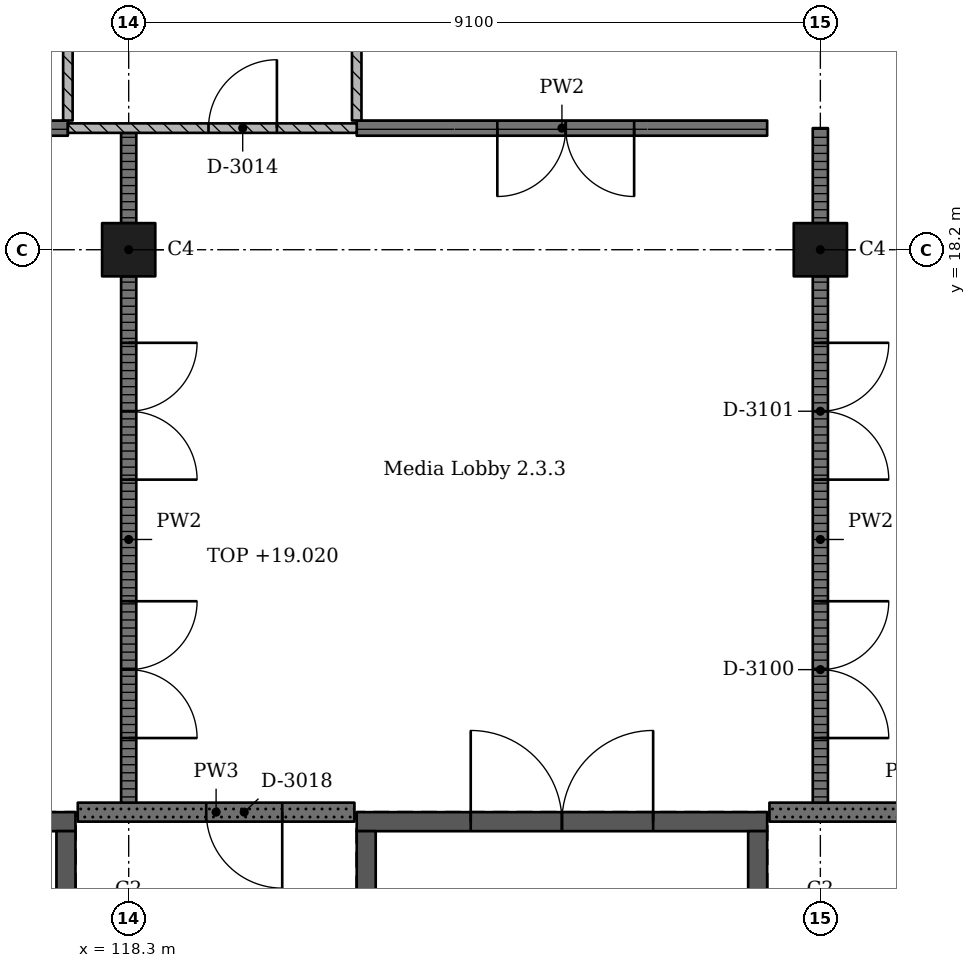
"""IFC4 building model, lengths in metres.
Left out: names, types, materials, properties, quantities, classifications, styles, units other than length and angle.
Written with IfcOpenShell. Run it as: python <this file> out.ifc"""

import sys

from ifc_helpers import new_model, si_unit, direction, frame, frame_2d, origin, origin_2d, place, context, subcontext, project, spatial, rectangle, extrude, element, fill, save


model = new_model("IFC4")
c1 = context("Model", 3, precision=1e-05, world=origin(), true_north=direction((0.0, 1.0)))
c2 = subcontext(c1, "Body", "Model", "MODEL_VIEW")
j1 = project(units=[si_unit("LENGTHUNIT", "METRE"), si_unit("PLANEANGLEUNIT", "RADIAN")], contexts=[c1])
p1 = place(None, origin())
s1 = spatial("IfcSite", under=j1, at=p1, CompositionType="ELEMENT")
p2 = place(p1, origin())
s2 = spatial("IfcBuilding", under=s1, at=p2, CompositionType="ELEMENT")
p3 = place(p2, frame((0.0, 0.0, 15.47)))
s3 = spatial("IfcBuildingStorey", under=s2, at=p3, CompositionType="ELEMENT", Elevation=15.47)
for number, where, z_axis, x_axis in (
    (1, (118.3, 18.2, 0.0), (0.0, 0.0, 1.0), (1.0, 0.0, 0.0)),
    (2, (127.4, 18.2, 0.0), (0.0, 0.0, 1.0), (1.0, 0.0, 0.0)),
):
    element("IfcColumn", number, at=place(p3, frame(where, z_axis=z_axis, x_axis=x_axis)), inside=s3, PredefinedType="COLUMN", context=c2, shape_type="SweptSolid", body=[
        extrude(rectangle(XDim=0.7, YDim=0.7, at=origin_2d()), origin(), (0.0, 0.0, 1.0), 4.55),
    ])
p4 = place(p3, frame((126.7, 10.675, 0.0), z_axis=(0.0, 0.0, 1.0), x_axis=(-1.0, 0.0, 0.0)))
e3 = element("IfcWall", 3, at=p4, inside=s3, PredefinedType="SHEAR", context=c2, shape_type="SweptSolid", body=[
    extrude(rectangle(XDim=5.4, YDim=0.25, at=frame_2d((2.7, 0.0))), origin(), (0.0, 0.0, 1.0), 4.55),
])
p5 = place(p4, frame((1.5, 0.0, 0.0)))
e4 = element("IfcOpeningElement", 4, at=p5, cuts=e3, PredefinedType="OPENING", context=c2, shape_type="SweptSolid", body=[
    extrude(rectangle(XDim=2.4, YDim=2.1, at=frame_2d((1.2, 1.05))), frame((0.0, 0.135, 0.0), z_axis=(0.0, -1.0, 0.0), x_axis=(1.0, 0.0, 0.0)), (0.0, 0.0, 1.0), 0.27),
])
for number, where, z_axis, x_axis in (
    (5, (121.425, 10.55, 0.0), (0.0, 0.0, 1.0), (0.0, -1.0, 0.0)),
    (6, (126.575, 10.55, 0.0), (0.0, 0.0, 1.0), (0.0, -1.0, 0.0)),
):
    element("IfcWall", number, at=place(p3, frame(where, z_axis=z_axis, x_axis=x_axis)), inside=s3, PredefinedType="SHEAR", context=c2, shape_type="SweptSolid", body=[
        extrude(rectangle(XDim=9.6, YDim=0.25, at=frame_2d((4.8, 0.0))), origin(), (0.0, 0.0, 1.0), 4.55),
    ])
p6 = place(p3, frame((117.6, 10.675, 0.0), z_axis=(0.0, 0.0, 1.0), x_axis=(-1.0, 0.0, 0.0)))
e7 = element("IfcWall", 7, at=p6, inside=s3, PredefinedType="SHEAR", context=c2, shape_type="SweptSolid", body=[
    extrude(rectangle(XDim=5.4, YDim=0.25, at=frame_2d((2.7, 0.0))), origin(), (0.0, 0.0, 1.0), 4.55),
])
p7 = place(p6, frame((1.5, 0.0, 0.0)))
e8 = element("IfcOpeningElement", 8, at=p7, cuts=e7, PredefinedType="OPENING", context=c2, shape_type="SweptSolid", body=[
    extrude(rectangle(XDim=2.4, YDim=2.1, at=frame_2d((1.2, 1.05))), frame((0.0, 0.135, 0.0), z_axis=(0.0, -1.0, 0.0), x_axis=(1.0, 0.0, 0.0)), (0.0, 0.0, 1.0), 0.27),
])
p8 = place(p3, frame((117.475, 10.55, 0.0), z_axis=(0.0, 0.0, 1.0), x_axis=(0.0, -1.0, 0.0)))
e9 = element("IfcWall", 9, at=p8, inside=s3, PredefinedType="SHEAR", context=c2, shape_type="SweptSolid", body=[
    extrude(rectangle(XDim=9.6, YDim=0.25, at=frame_2d((4.8, 0.0))), origin(), (0.0, 0.0, 1.0), 4.55),
])
p9 = place(p3, frame((112.2, 19.8, 0.0), z_axis=(0.0, 0.0, 1.0), x_axis=(1.0, 0.0, 0.0)))
e10 = element("IfcWall", 10, at=p9, inside=s3, PredefinedType="PARTITIONING", context=c2, shape_type="SweptSolid", body=[
    extrude(rectangle(XDim=5.3, YDim=0.2, at=frame_2d((2.65, 0.0))), origin(), (0.0, 0.0, 1.0), 4.3),
])
p10 = place(p9, frame((1.75, 0.0, 0.0)))
e11 = element("IfcOpeningElement", 11, at=p10, cuts=e10, PredefinedType="OPENING", context=c2, shape_type="SweptSolid", body=[
    extrude(rectangle(XDim=1.8, YDim=2.4, at=frame_2d((0.9, 1.2))), frame((0.0, 0.11, 0.0), z_axis=(0.0, -1.0, 0.0), x_axis=(1.0, 0.0, 0.0)), (0.0, 0.0, 1.0), 0.22),
])
p11 = place(p3, frame((117.5, 19.8, 0.0), z_axis=(0.0, 0.0, 1.0), x_axis=(1.0, 0.0, 0.0)))
e12 = element("IfcWall", 12, at=p11, inside=s3, PredefinedType="PARTITIONING", context=c2, shape_type="SweptSolid", body=[
    extrude(rectangle(XDim=3.8, YDim=0.125, at=frame_2d((1.9, 0.0))), origin(), (0.0, 0.0, 1.0), 4.3),
])
p12 = place(p11, frame((1.85, 0.0, 0.0)))
e13 = element("IfcOpeningElement", 13, at=p12, cuts=e12, PredefinedType="OPENING", context=c2, shape_type="SweptSolid", body=[
    extrude(rectangle(XDim=0.9, YDim=2.1, at=frame_2d((0.45, 1.05))), frame((0.0, 0.073, 0.0), z_axis=(0.0, -1.0, 0.0), x_axis=(1.0, 0.0, 0.0)), (0.0, 0.0, 1.0), 0.145),
])
p13 = place(p3, frame((117.5, 19.9, 0.0), z_axis=(0.0, 0.0, 1.0), x_axis=(0.0, 1.0, 0.0)))
e14 = element("IfcWall", 14, at=p13, inside=s3, PredefinedType="PARTITIONING", context=c2, shape_type="SweptSolid", body=[
    extrude(rectangle(XDim=2.87, YDim=0.125, at=frame_2d((1.435, 0.0))), origin(), (0.0, 0.0, 1.0), 4.3),
])
p14 = place(p3, frame((117.63, 10.8, 0.0), z_axis=(0.0, 0.0, 1.0), x_axis=(1.0, 0.0, 0.0)))
e15 = element("IfcWall", 15, at=p14, inside=s3, PredefinedType="SOLIDWALL", context=c2, shape_type="SweptSolid", body=[
    extrude(rectangle(XDim=3.64, YDim=0.25, at=frame_2d((1.82, 0.0))), origin(), (0.0, 0.0, 1.0), 4.3),
])
p15 = place(p14, frame((1.69, 0.0, 0.0)))
e16 = element("IfcOpeningElement", 16, at=p15, cuts=e15, PredefinedType="OPENING", context=c2, shape_type="SweptSolid", body=[
    extrude(rectangle(XDim=1.0, YDim=2.1, at=frame_2d((0.5, 1.05))), frame((0.0, 0.135, 0.0), z_axis=(0.0, -1.0, 0.0), x_axis=(1.0, 0.0, 0.0)), (0.0, 0.0, 1.0), 0.27),
])
p16 = place(p3, frame((118.3, 10.925, 0.0), z_axis=(0.0, 0.0, 1.0), x_axis=(0.0, 1.0, 0.0)))
e17 = element("IfcWall", 17, at=p16, inside=s3, PredefinedType="PARTITIONING", context=c2, shape_type="SweptSolid", body=[
    extrude(rectangle(XDim=6.925, YDim=0.2, at=frame_2d((3.462, 0.0))), origin(), (0.0, 0.0, 1.0), 3.55),
])
p17 = place(p16, frame((0.85, 0.0, 0.0)))
e18 = element("IfcOpeningElement", 18, at=p17, cuts=e17, PredefinedType="OPENING", context=c2, shape_type="SweptSolid", body=[
    extrude(rectangle(XDim=1.8, YDim=2.4, at=frame_2d((0.9, 1.2))), frame((0.0, 0.11, 0.0), z_axis=(0.0, -1.0, 0.0), x_axis=(1.0, 0.0, 0.0)), (0.0, 0.0, 1.0), 0.22),
])
p18 = place(p16, frame((4.25, 0.0, 0.0)))
e19 = element("IfcOpeningElement", 19, at=p18, cuts=e17, PredefinedType="OPENING", context=c2, shape_type="SweptSolid", body=[
    extrude(rectangle(XDim=1.8, YDim=2.4, at=frame_2d((0.9, 1.2))), frame((0.0, 0.11, 0.0), z_axis=(0.0, -1.0, 0.0), x_axis=(1.0, 0.0, 0.0)), (0.0, 0.0, 1.0), 0.22),
])
p19 = place(p3, frame((118.3, 18.55, 0.0), z_axis=(0.0, 0.0, 1.0), x_axis=(0.0, 1.0, 0.0)))
e20 = element("IfcWall", 20, at=p19, inside=s3, PredefinedType="PARTITIONING", context=c2, shape_type="SweptSolid", body=[
    extrude(rectangle(XDim=1.188, YDim=0.2, at=frame_2d((0.594, 0.0))), origin(), (0.0, 0.0, 1.0), 3.55),
])
p20 = place(p3, frame((121.3, 19.8, 0.0), z_axis=(0.0, 0.0, 1.0), x_axis=(1.0, 0.0, 0.0)))
e21 = element("IfcWall", 21, at=p20, inside=s3, PredefinedType="PARTITIONING", context=c2, shape_type="SweptSolid", body=[
    extrude(rectangle(XDim=5.4, YDim=0.2, at=frame_2d((2.7, 0.0))), origin(), (0.0, 0.0, 1.0), 4.3),
])
p21 = place(p20, frame((1.85, 0.0, 0.0)))
e22 = element("IfcOpeningElement", 22, at=p21, cuts=e21, PredefinedType="OPENING", context=c2, shape_type="SweptSolid", body=[
    extrude(rectangle(XDim=1.8, YDim=2.4, at=frame_2d((0.9, 1.2))), frame((0.0, 0.11, 0.0), z_axis=(0.0, -1.0, 0.0), x_axis=(1.0, 0.0, 0.0)), (0.0, 0.0, 1.0), 0.22),
])
p22 = place(p3, frame((121.3, 19.9, 0.0), z_axis=(0.0, 0.0, 1.0), x_axis=(0.0, 1.0, 0.0)))
e23 = element("IfcWall", 23, at=p22, inside=s3, PredefinedType="PARTITIONING", context=c2, shape_type="SweptSolid", body=[
    extrude(rectangle(XDim=6.97, YDim=0.125, at=frame_2d((3.485, 0.0))), origin(), (0.0, 0.0, 1.0), 4.3),
])
p23 = place(p3, frame((126.73, 10.8, 0.0), z_axis=(0.0, 0.0, 1.0), x_axis=(1.0, 0.0, 0.0)))
e24 = element("IfcWall", 24, at=p23, inside=s3, PredefinedType="SOLIDWALL", context=c2, shape_type="SweptSolid", body=[
    extrude(rectangle(XDim=3.64, YDim=0.25, at=frame_2d((1.82, 0.0))), origin(), (0.0, 0.0, 1.0), 4.3),
])
p24 = place(p23, frame((1.79, 0.0, 0.0)))
e25 = element("IfcOpeningElement", 25, at=p24, cuts=e24, PredefinedType="OPENING", context=c2, shape_type="SweptSolid", body=[
    extrude(rectangle(XDim=0.8, YDim=2.1, at=frame_2d((0.4, 1.05))), frame((0.0, 0.135, 0.0), z_axis=(0.0, -1.0, 0.0), x_axis=(1.0, 0.0, 0.0)), (0.0, 0.0, 1.0), 0.27),
])
p25 = place(p3, frame((127.4, 10.925, 0.0), z_axis=(0.0, 0.0, 1.0), x_axis=(0.0, 1.0, 0.0)))
e26 = element("IfcWall", 26, at=p25, inside=s3, PredefinedType="PARTITIONING", context=c2, shape_type="SweptSolid", body=[
    extrude(rectangle(XDim=6.925, YDim=0.2, at=frame_2d((3.462, 0.0))), origin(), (0.0, 0.0, 1.0), 3.55),
])
p26 = place(p25, frame((0.85, 0.0, 0.0)))
e27 = element("IfcOpeningElement", 27, at=p26, cuts=e26, PredefinedType="OPENING", context=c2, shape_type="SweptSolid", body=[
    extrude(rectangle(XDim=1.8, YDim=2.4, at=frame_2d((0.9, 1.2))), frame((0.0, 0.11, 0.0), z_axis=(0.0, -1.0, 0.0), x_axis=(1.0, 0.0, 0.0)), (0.0, 0.0, 1.0), 0.22),
])
p27 = place(p25, frame((4.25, 0.0, 0.0)))
e28 = element("IfcOpeningElement", 28, at=p27, cuts=e26, PredefinedType="OPENING", context=c2, shape_type="SweptSolid", body=[
    extrude(rectangle(XDim=1.8, YDim=2.4, at=frame_2d((0.9, 1.2))), frame((0.0, 0.11, 0.0), z_axis=(0.0, -1.0, 0.0), x_axis=(1.0, 0.0, 0.0)), (0.0, 0.0, 1.0), 0.22),
])
p28 = place(p3, frame((127.4, 18.55, 0.0), z_axis=(0.0, 0.0, 1.0), x_axis=(0.0, 1.0, 0.0)))
e29 = element("IfcWall", 29, at=p28, inside=s3, PredefinedType="PARTITIONING", context=c2, shape_type="SweptSolid", body=[
    extrude(rectangle(XDim=1.25, YDim=0.2, at=frame_2d((0.625, 0.0))), origin(), (0.0, 0.0, 1.0), 3.55),
])
p29 = place(p12, origin())
e30 = element("IfcDoor", 30, at=p29, inside=s3, OperationType="SINGLE_SWING_LEFT", PredefinedType="DOOR", context=c2, shape_type="SweptSolid", body=[
    extrude(rectangle(XDim=0.9, YDim=2.1, at=frame_2d((0.45, 1.05))), frame((0.0, 0.025, 0.0), z_axis=(0.0, -1.0, 0.0), x_axis=(1.0, 0.0, 0.0)), (0.0, 0.0, 1.0), 0.05),
])
fill(e13, e30)
p30 = place(p15, origin())
e31 = element("IfcDoor", 31, at=p30, inside=s3, OperationType="SINGLE_SWING_RIGHT", PredefinedType="DOOR", context=c2, shape_type="SweptSolid", body=[
    extrude(rectangle(XDim=1.0, YDim=2.1, at=frame_2d((0.5, 1.05))), frame((0.0, 0.025, 0.0), z_axis=(0.0, -1.0, 0.0), x_axis=(1.0, 0.0, 0.0)), (0.0, 0.0, 1.0), 0.05),
])
fill(e16, e31)
p31 = place(p26, origin())
e32 = element("IfcDoor", 32, at=p31, inside=s3, OperationType="DOUBLE_DOOR_SINGLE_SWING", PredefinedType="DOOR", context=c2, shape_type="SweptSolid", body=[
    extrude(rectangle(XDim=1.8, YDim=2.4, at=frame_2d((0.9, 1.2))), frame((0.0, 0.025, 0.0), z_axis=(0.0, -1.0, 0.0), x_axis=(1.0, 0.0, 0.0)), (0.0, 0.0, 1.0), 0.05),
])
fill(e27, e32)
p32 = place(p27, origin())
e33 = element("IfcDoor", 33, at=p32, inside=s3, OperationType="DOUBLE_DOOR_SINGLE_SWING", PredefinedType="DOOR", context=c2, shape_type="SweptSolid", body=[
    extrude(rectangle(XDim=1.8, YDim=2.4, at=frame_2d((0.9, 1.2))), frame((0.0, 0.025, 0.0), z_axis=(0.0, -1.0, 0.0), x_axis=(1.0, 0.0, 0.0)), (0.0, 0.0, 1.0), 0.05),
])
fill(e28, e33)
p33 = place(p17, origin())
e34 = element("IfcDoor", 34, at=p33, inside=s3, OperationType="DOUBLE_DOOR_SINGLE_SWING", PredefinedType="DOOR", context=c2, shape_type="SweptSolid", body=[
    extrude(rectangle(XDim=1.8, YDim=2.4, at=frame_2d((0.9, 1.2))), frame((0.0, 0.025, 0.0), z_axis=(0.0, -1.0, 0.0), x_axis=(1.0, 0.0, 0.0)), (0.0, 0.0, 1.0), 0.05),
])
fill(e18, e34)
p34 = place(p18, origin())
e35 = element("IfcDoor", 35, at=p34, inside=s3, OperationType="DOUBLE_DOOR_SINGLE_SWING", PredefinedType="DOOR", context=c2, shape_type="SweptSolid", body=[
    extrude(rectangle(XDim=1.8, YDim=2.4, at=frame_2d((0.9, 1.2))), frame((0.0, 0.025, 0.0), z_axis=(0.0, -1.0, 0.0), x_axis=(1.0, 0.0, 0.0)), (0.0, 0.0, 1.0), 0.05),
])
fill(e19, e35)
p35 = place(p21, origin())
e36 = element("IfcDoor", 36, at=p35, inside=s3, OperationType="DOUBLE_DOOR_SINGLE_SWING", PredefinedType="DOOR", context=c2, shape_type="SweptSolid", body=[
    extrude(rectangle(XDim=1.8, YDim=2.4, at=frame_2d((0.9, 1.2))), frame((0.0, 0.025, 0.0), z_axis=(0.0, -1.0, 0.0), x_axis=(1.0, 0.0, 0.0)), (0.0, 0.0, 1.0), 0.05),
])
fill(e22, e36)
p36 = place(p5, origin())
e37 = element("IfcDoor", 37, at=p36, inside=s3, OperationType="DOUBLE_DOOR_SINGLE_SWING", PredefinedType="DOOR", context=c2, shape_type="SweptSolid", body=[
    extrude(rectangle(XDim=2.4, YDim=2.1, at=frame_2d((1.2, 1.05))), frame((0.0, 0.025, 0.0), z_axis=(0.0, -1.0, 0.0), x_axis=(1.0, 0.0, 0.0)), (0.0, 0.0, 1.0), 0.05),
])
fill(e4, e37)
save(model, sys.argv[1])
